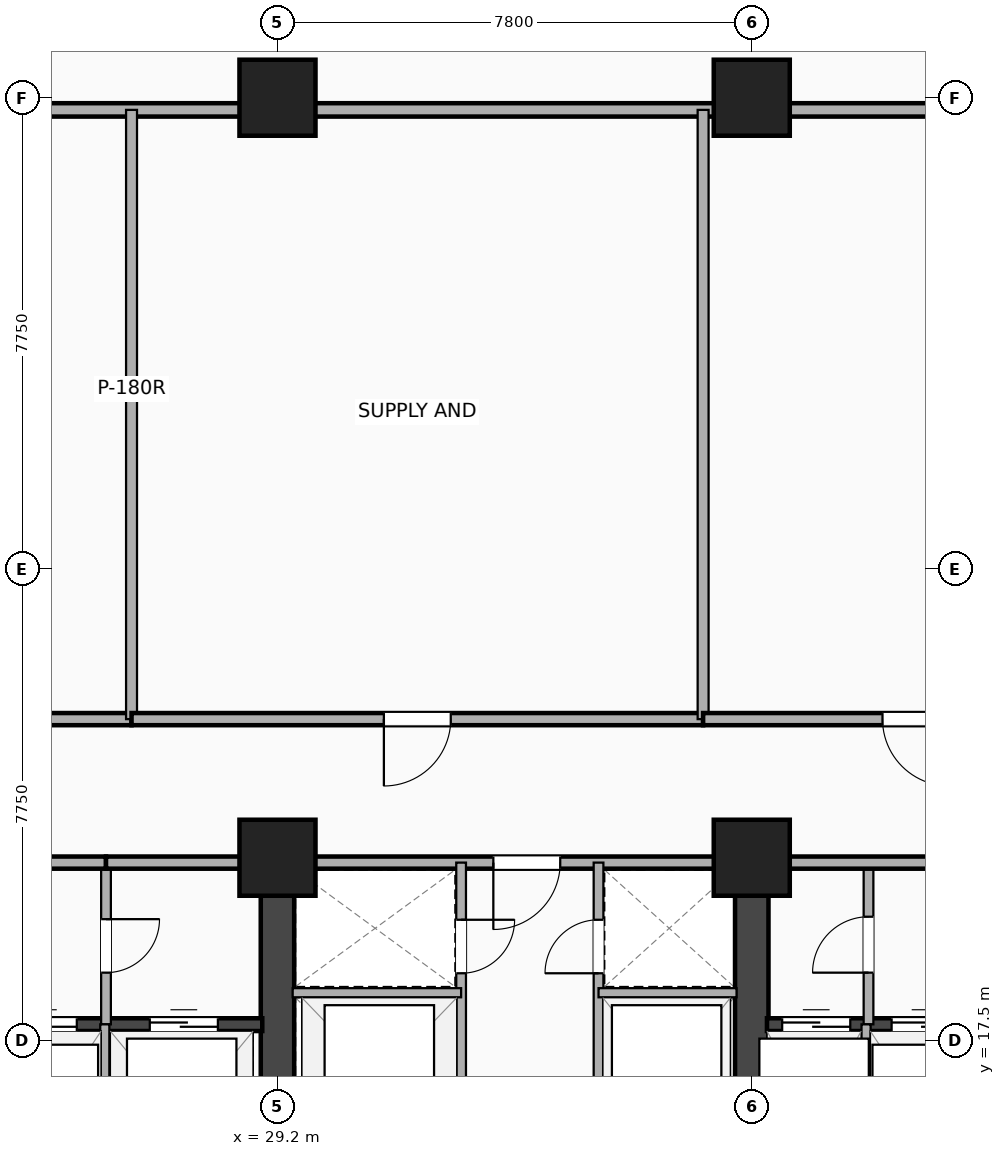
"""IFC4 building model, lengths in metres.
Left out: names, types, materials, properties, quantities, classifications, styles, units other than length and angle.
Written with IfcOpenShell. Run it as: python <this file> out.ifc"""

import sys

from ifc_helpers import new_model, si_unit, direction, frame, frame_2d, origin, origin_2d, place, context, subcontext, project, spatial, rectangle, extrude, element, fill, save


model = new_model("IFC4")
c1 = context("Model", 3, precision=1e-05, world=origin(), true_north=direction((0.0, 1.0)))
c2 = subcontext(c1, "Body", "Model", "MODEL_VIEW")
j1 = project(units=[si_unit("LENGTHUNIT", "METRE"), si_unit("PLANEANGLEUNIT", "RADIAN")], contexts=[c1])
p1 = place(None, origin())
s1 = spatial("IfcSite", under=j1, at=p1, CompositionType="ELEMENT")
p2 = place(p1, origin())
s2 = spatial("IfcBuilding", under=s1, at=p2, CompositionType="ELEMENT")
p3 = place(p2, frame((0.0, 0.0, 130.2)))
s3 = spatial("IfcBuildingStorey", under=s2, at=p3, CompositionType="ELEMENT", Elevation=130.2)
p4 = place(p3, frame((29.2, 3.5, 0.0), z_axis=(0.0, 0.0, 1.0), x_axis=(0.0, 1.0, 0.0)))
e1 = element("IfcWall", 1, at=p4, inside=s3, PredefinedType="SHEAR", context=c2, shape_type="SweptSolid", body=[
    extrude(rectangle(XDim=16.9, YDim=0.55, at=frame_2d((8.45, 0.0))), origin(), (0.0, 0.0, 1.0), 8.15),
])
p5 = place(p4, frame((7.75, 0.0, 0.0), z_axis=(0.0, 0.0, 1.0), x_axis=(-1.0, 0.0, 0.0)))
e2 = element("IfcOpeningElement", 2, at=p5, cuts=e1, PredefinedType="OPENING", context=c2, shape_type="SweptSolid", body=[
    extrude(rectangle(XDim=1.1, YDim=2.15, at=frame_2d((0.55, 1.075))), frame((0.0, 0.285, 0.0), z_axis=(0.0, -1.0, 0.0), x_axis=(1.0, 0.0, 0.0)), (0.0, 0.0, 1.0), 0.57),
])
p6 = place(p3, frame((37.0, 3.5, 0.0), z_axis=(0.0, 0.0, 1.0), x_axis=(0.0, 1.0, 0.0)))
e3 = element("IfcWall", 3, at=p6, inside=s3, PredefinedType="SHEAR", context=c2, shape_type="SweptSolid", body=[
    extrude(rectangle(XDim=16.9, YDim=0.55, at=frame_2d((8.45, 0.0))), origin(), (0.0, 0.0, 1.0), 8.15),
])
p7 = place(p6, frame((6.65, 0.0, 0.0)))
e4 = element("IfcOpeningElement", 4, at=p7, cuts=e3, PredefinedType="OPENING", context=c2, shape_type="SweptSolid", body=[
    extrude(rectangle(XDim=1.1, YDim=2.15, at=frame_2d((0.55, 1.075))), frame((0.0, 0.285, 0.0), z_axis=(0.0, -1.0, 0.0), x_axis=(1.0, 0.0, 0.0)), (0.0, 0.0, 1.0), 0.57),
])
p8 = place(p3, frame((20.65, 17.755, 0.0), z_axis=(0.0, 0.0, 1.0), x_axis=(1.0, 0.0, 0.0)))
e5 = element("IfcWall", 5, at=p8, inside=s3, PredefinedType="SHEAR", context=c2, shape_type="SweptSolid", body=[
    extrude(rectangle(XDim=8.3, YDim=0.21, at=frame_2d((4.15, 0.0))), origin(), (0.0, 0.0, 1.0), 8.15),
])
p9 = place(p8, frame((2.2, 0.0, 0.0), z_axis=(0.0, 0.0, 1.0), x_axis=(-1.0, 0.0, 0.0)))
e6 = element("IfcOpeningElement", 6, at=p9, cuts=e5, PredefinedType="OPENING", context=c2, shape_type="SweptSolid", body=[
    extrude(rectangle(XDim=1.05, YDim=2.15, at=frame_2d((0.525, 1.075))), frame((0.0, 0.115, 0.0), z_axis=(0.0, -1.0, 0.0), x_axis=(1.0, 0.0, 0.0)), (0.0, 0.0, 1.0), 0.23),
])
p10 = place(p8, frame((4.15, 0.0, 0.0)))
e7 = element("IfcOpeningElement", 7, at=p10, cuts=e5, PredefinedType="OPENING", context=c2, shape_type="SweptSolid", body=[
    extrude(rectangle(XDim=1.1, YDim=2.18, at=frame_2d((0.55, 1.09))), frame((0.0, 0.115, 0.0), z_axis=(0.0, -1.0, 0.0), x_axis=(1.0, 0.0, 0.0)), (0.0, 0.0, 1.0), 0.23),
])
p11 = place(p8, frame((6.45, 0.0, 0.0)))
e8 = element("IfcOpeningElement", 8, at=p11, cuts=e5, PredefinedType="OPENING", context=c2, shape_type="SweptSolid", body=[
    extrude(rectangle(XDim=1.12, YDim=2.2, at=frame_2d((0.56, 1.1))), frame((0.0, 0.115, 0.0), z_axis=(0.0, -1.0, 0.0), x_axis=(1.0, 0.0, 0.0)), (0.0, 0.0, 1.0), 0.23),
])
p12 = place(p3, frame((37.25, 17.755, 0.0), z_axis=(0.0, 0.0, 1.0), x_axis=(1.0, 0.0, 0.0)))
e9 = element("IfcWall", 9, at=p12, inside=s3, PredefinedType="SHEAR", context=c2, shape_type="SweptSolid", body=[
    extrude(rectangle(XDim=7.2, YDim=0.21, at=frame_2d((3.6, 0.0))), origin(), (0.0, 0.0, 1.0), 8.15),
])
p13 = place(p12, frame((0.25, 0.0, 0.0)))
e10 = element("IfcOpeningElement", 10, at=p13, cuts=e9, PredefinedType="OPENING", context=c2, shape_type="SweptSolid", body=[
    extrude(rectangle(XDim=1.12, YDim=2.2, at=frame_2d((0.56, 1.1))), frame((0.0, 0.115, 0.0), z_axis=(0.0, -1.0, 0.0), x_axis=(1.0, 0.0, 0.0)), (0.0, 0.0, 1.0), 0.23),
])
p14 = place(p12, frame((2.05, 0.0, 0.0)))
e11 = element("IfcOpeningElement", 11, at=p14, cuts=e9, PredefinedType="OPENING", context=c2, shape_type="SweptSolid", body=[
    extrude(rectangle(XDim=1.1, YDim=2.18, at=frame_2d((0.55, 1.09))), frame((0.0, 0.115, 0.0), z_axis=(0.0, -1.0, 0.0), x_axis=(1.0, 0.0, 0.0)), (0.0, 0.0, 1.0), 0.23),
])
p15 = place(p12, frame((5.78, 0.0, 0.0), z_axis=(0.0, 0.0, 1.0), x_axis=(-1.0, 0.0, 0.0)))
e12 = element("IfcOpeningElement", 12, at=p15, cuts=e9, PredefinedType="OPENING", context=c2, shape_type="SweptSolid", body=[
    extrude(rectangle(XDim=1.05, YDim=2.15, at=frame_2d((0.525, 1.075))), frame((0.0, 0.115, 0.0), z_axis=(0.0, -1.0, 0.0), x_axis=(1.0, 0.0, 0.0)), (0.0, 0.0, 1.0), 0.23),
])
for number, where, z_axis, x_axis in (
    (13, (29.2, 20.5, -0.32), (0.0, 0.0, 1.0), (1.0, 0.0, 0.0)),
    (14, (37.0, 20.5, -0.32), (0.0, 0.0, 1.0), (1.0, 0.0, 0.0)),
    (15, (29.2, 33.0, -0.32), (0.0, 0.0, 1.0), (1.0, 0.0, 0.0)),
    (16, (37.0, 33.0, -0.32), (0.0, 0.0, 1.0), (1.0, 0.0, 0.0)),
):
    element("IfcColumn", number, at=place(p3, frame(where, z_axis=z_axis, x_axis=x_axis)), inside=s3, PredefinedType="COLUMN", context=c2, shape_type="SweptSolid", body=[
        extrude(rectangle(XDim=1.25, YDim=1.25, at=origin_2d()), origin(), (0.0, 0.0, 1.0), 8.47),
    ])
p16 = place(p3, frame((26.38, 17.76, 0.0), z_axis=(0.0, 0.0, 1.0), x_axis=(0.0, 1.0, 0.0)))
e17 = element("IfcWall", 17, at=p16, inside=s3, PredefinedType="PARTITIONING", context=c2, shape_type="SweptSolid", body=[
    extrude(rectangle(XDim=2.66, YDim=0.16, at=frame_2d((1.33, 0.0))), origin(), (0.0, 0.0, 1.0), 7.524),
])
p17 = place(p16, frame((0.85, 0.0, 0.0)))
e18 = element("IfcOpeningElement", 18, at=p17, cuts=e17, PredefinedType="OPENING", context=c2, shape_type="SweptSolid", body=[
    extrude(rectangle(XDim=0.88, YDim=2.08, at=frame_2d((0.44, 1.04))), frame((0.0, 0.09, 0.0), z_axis=(0.0, -1.0, 0.0), x_axis=(1.0, 0.0, 0.0)), (0.0, 0.0, 1.0), 0.18),
])
p18 = place(p3, frame((38.92, 17.76, 0.0), z_axis=(0.0, 0.0, 1.0), x_axis=(0.0, 1.0, 0.0)))
e19 = element("IfcWall", 19, at=p18, inside=s3, PredefinedType="PARTITIONING", context=c2, shape_type="SweptSolid", body=[
    extrude(rectangle(XDim=2.66, YDim=0.16, at=frame_2d((1.33, 0.0))), origin(), (0.0, 0.0, 1.0), 7.524),
])
p19 = place(p18, frame((1.77, 0.0, 0.0), z_axis=(0.0, 0.0, 1.0), x_axis=(-1.0, 0.0, 0.0)))
e20 = element("IfcOpeningElement", 20, at=p19, cuts=e19, PredefinedType="OPENING", context=c2, shape_type="SweptSolid", body=[
    extrude(rectangle(XDim=0.92, YDim=2.08, at=frame_2d((0.46, 1.04))), frame((0.0, 0.09, 0.0), z_axis=(0.0, -1.0, 0.0), x_axis=(1.0, 0.0, 0.0)), (0.0, 0.0, 1.0), 0.18),
])
for number, where, z_axis, x_axis in (
    (21, (26.36, 14.72, 0.0), (0.0, 0.0, 1.0), (0.0, 1.0, 0.0)),
    (22, (38.88, 14.72, 0.0), (0.0, 0.0, 1.0), (0.0, 1.0, 0.0)),
):
    element("IfcWall", number, at=place(p3, frame(where, z_axis=z_axis, x_axis=x_axis)), inside=s3, PredefinedType="PARTITIONING", context=c2, shape_type="SweptSolid", body=[
        extrude(rectangle(XDim=3.04, YDim=0.15, at=frame_2d((1.52, 0.0))), origin(), (0.0, 0.0, 1.0), 8.15),
    ])
p20 = place(p3, frame((20.65, 20.42, 0.0), z_axis=(0.0, 0.0, 1.0), x_axis=(1.0, 0.0, 0.0)))
e23 = element("IfcWall", 23, at=p20, inside=s3, PredefinedType="PARTITIONING", context=c2, shape_type="SweptSolid", body=[
    extrude(rectangle(XDim=5.73, YDim=0.2, at=frame_2d((2.865, 0.0))), origin(), (0.0, 0.0, 1.0), 7.223),
])
p21 = place(p20, frame((2.3, 0.0, 0.0)))
e24 = element("IfcOpeningElement", 24, at=p21, cuts=e23, PredefinedType="OPENING", context=c2, shape_type="SweptSolid", body=[
    extrude(rectangle(XDim=1.1, YDim=2.15, at=frame_2d((0.55, 1.075))), frame((0.0, 0.11, 0.0), z_axis=(0.0, -1.0, 0.0), x_axis=(1.0, 0.0, 0.0)), (0.0, 0.0, 1.0), 0.22),
])
p22 = place(p3, frame((26.38, 20.42, 0.0), z_axis=(0.0, 0.0, 1.0), x_axis=(1.0, 0.0, 0.0)))
e25 = element("IfcWall", 25, at=p22, inside=s3, PredefinedType="PARTITIONING", context=c2, shape_type="SweptSolid", body=[
    extrude(rectangle(XDim=2.82, YDim=0.2, at=frame_2d((1.41, 0.0))), origin(), (0.0, 0.0, 1.0), 7.223),
])
p23 = place(p3, frame((29.2, 20.42, 0.0), z_axis=(0.0, 0.0, 1.0), x_axis=(1.0, 0.0, 0.0)))
e26 = element("IfcWall", 26, at=p23, inside=s3, PredefinedType="PARTITIONING", context=c2, shape_type="SweptSolid", body=[
    extrude(rectangle(XDim=7.8, YDim=0.2, at=frame_2d((3.9, 0.0))), origin(), (0.0, 0.0, 1.0), 7.223),
])
p24 = place(p23, frame((3.55, 0.0, 0.0)))
e27 = element("IfcOpeningElement", 27, at=p24, cuts=e26, PredefinedType="OPENING", context=c2, shape_type="SweptSolid", body=[
    extrude(rectangle(XDim=1.1, YDim=2.15, at=frame_2d((0.55, 1.075))), frame((0.0, 0.11, 0.0), z_axis=(0.0, -1.0, 0.0), x_axis=(1.0, 0.0, 0.0)), (0.0, 0.0, 1.0), 0.22),
])
p25 = place(p3, frame((37.0, 20.42, 0.0), z_axis=(0.0, 0.0, 1.0), x_axis=(1.0, 0.0, 0.0)))
e28 = element("IfcWall", 28, at=p25, inside=s3, PredefinedType="PARTITIONING", context=c2, shape_type="SweptSolid", body=[
    extrude(rectangle(XDim=7.45, YDim=0.2, at=frame_2d((3.725, 0.0))), origin(), (0.0, 0.0, 1.0), 6.455),
])
p26 = place(p25, frame((4.2, 0.0, 0.0)))
e29 = element("IfcOpeningElement", 29, at=p26, cuts=e28, PredefinedType="OPENING", context=c2, shape_type="SweptSolid", body=[
    extrude(rectangle(XDim=1.1, YDim=2.15, at=frame_2d((0.55, 1.075))), frame((0.0, 0.11, 0.0), z_axis=(0.0, -1.0, 0.0), x_axis=(1.0, 0.0, 0.0)), (0.0, 0.0, 1.0), 0.22),
])
p27 = place(p3, frame((32.22, 12.5, 0.0), z_axis=(0.0, 0.0, 1.0), x_axis=(0.0, 1.0, 0.0)))
e30 = element("IfcWall", 30, at=p27, inside=s3, PredefinedType="PARTITIONING", context=c2, shape_type="SweptSolid", body=[
    extrude(rectangle(XDim=7.92, YDim=0.16, at=frame_2d((3.96, 0.0))), origin(), (0.0, 0.0, 1.0), 7.524),
])
p28 = place(p27, frame((6.1, 0.0, 0.0)))
e31 = element("IfcOpeningElement", 31, at=p28, cuts=e30, PredefinedType="OPENING", context=c2, shape_type="SweptSolid", body=[
    extrude(rectangle(XDim=0.88, YDim=2.08, at=frame_2d((0.44, 1.04))), frame((0.0, 0.09, 0.0), z_axis=(0.0, -1.0, 0.0), x_axis=(1.0, 0.0, 0.0)), (0.0, 0.0, 1.0), 0.18),
])
p29 = place(p3, frame((34.48, 12.5, 0.0), z_axis=(0.0, 0.0, 1.0), x_axis=(0.0, 1.0, 0.0)))
e32 = element("IfcWall", 32, at=p29, inside=s3, PredefinedType="PARTITIONING", context=c2, shape_type="SweptSolid", body=[
    extrude(rectangle(XDim=7.92, YDim=0.16, at=frame_2d((3.96, 0.0))), origin(), (0.0, 0.0, 1.0), 7.524),
])
p30 = place(p29, frame((6.98, 0.0, 0.0), z_axis=(0.0, 0.0, 1.0), x_axis=(-1.0, 0.0, 0.0)))
e33 = element("IfcOpeningElement", 33, at=p30, cuts=e32, PredefinedType="OPENING", context=c2, shape_type="SweptSolid", body=[
    extrude(rectangle(XDim=0.88, YDim=2.08, at=frame_2d((0.44, 1.04))), frame((0.0, 0.09, 0.0), z_axis=(0.0, -1.0, 0.0), x_axis=(1.0, 0.0, 0.0)), (0.0, 0.0, 1.0), 0.18),
])
p31 = place(p3, frame((29.45, 18.28, 0.0), z_axis=(0.0, 0.0, 1.0), x_axis=(1.0, 0.0, 0.0)))
e34 = element("IfcWall", 34, at=p31, inside=s3, PredefinedType="PARTITIONING", context=c2, shape_type="SweptSolid", body=[
    extrude(rectangle(XDim=2.77, YDim=0.15, at=frame_2d((1.385, 0.0))), origin(), (0.0, 0.0, 1.0), 8.15),
])
p32 = place(p3, frame((34.48, 18.28, 0.0), z_axis=(0.0, 0.0, 1.0), x_axis=(1.0, 0.0, 0.0)))
e35 = element("IfcWall", 35, at=p32, inside=s3, PredefinedType="PARTITIONING", context=c2, shape_type="SweptSolid", body=[
    extrude(rectangle(XDim=2.27, YDim=0.15, at=frame_2d((1.135, 0.0))), origin(), (0.0, 0.0, 1.0), 8.15),
])
p33 = place(p3, frame((15.45, 32.8, 0.0), z_axis=(0.0, 0.0, 1.0), x_axis=(1.0, 0.0, 0.0)))
e36 = element("IfcWall", 36, at=p33, inside=s3, PredefinedType="PARTITIONING", context=c2, shape_type="SweptSolid", body=[
    extrude(rectangle(XDim=39.45, YDim=0.22, at=frame_2d((19.725, 0.0))), origin(), (0.0, 0.0, 1.0), 6.455),
])
p34 = place(p3, frame((15.45, 22.78, 0.0), z_axis=(0.0, 0.0, 1.0), x_axis=(1.0, 0.0, 0.0)))
e37 = element("IfcWall", 37, at=p34, inside=s3, PredefinedType="PARTITIONING", context=c2, shape_type="SweptSolid", body=[
    extrude(rectangle(XDim=11.35, YDim=0.2, at=frame_2d((5.675, 0.0))), origin(), (0.0, 0.0, 1.0), 7.223),
])
p35 = place(p34, frame((5.125, 0.0, 0.0)))
e38 = element("IfcOpeningElement", 38, at=p35, cuts=e37, PredefinedType="OPENING", context=c2, shape_type="SweptSolid", body=[
    extrude(rectangle(XDim=1.1, YDim=2.15, at=frame_2d((0.55, 1.075))), frame((0.0, 0.11, 0.0), z_axis=(0.0, -1.0, 0.0), x_axis=(1.0, 0.0, 0.0)), (0.0, 0.0, 1.0), 0.22),
])
p36 = place(p3, frame((26.8, 22.78, 0.0), z_axis=(0.0, 0.0, 1.0), x_axis=(0.0, 1.0, 0.0)))
e39 = element("IfcWall", 39, at=p36, inside=s3, PredefinedType="PARTITIONING", context=c2, shape_type="SweptSolid", body=[
    extrude(rectangle(XDim=10.02, YDim=0.18, at=frame_2d((5.01, 0.0))), origin(), (0.0, 0.0, 1.0), 7.524),
])
p37 = place(p3, frame((26.8, 22.78, 0.0), z_axis=(0.0, 0.0, 1.0), x_axis=(1.0, 0.0, 0.0)))
e40 = element("IfcWall", 40, at=p37, inside=s3, PredefinedType="PARTITIONING", context=c2, shape_type="SweptSolid", body=[
    extrude(rectangle(XDim=9.4, YDim=0.2, at=frame_2d((4.7, 0.0))), origin(), (0.0, 0.0, 1.0), 7.223),
])
p38 = place(p37, frame((4.15, 0.0, 0.0)))
e41 = element("IfcOpeningElement", 41, at=p38, cuts=e40, PredefinedType="OPENING", context=c2, shape_type="SweptSolid", body=[
    extrude(rectangle(XDim=1.1, YDim=2.15, at=frame_2d((0.55, 1.075))), frame((0.0, 0.11, 0.0), z_axis=(0.0, -1.0, 0.0), x_axis=(1.0, 0.0, 0.0)), (0.0, 0.0, 1.0), 0.22),
])
p39 = place(p3, frame((36.2, 22.78, 0.0), z_axis=(0.0, 0.0, 1.0), x_axis=(0.0, 1.0, 0.0)))
e42 = element("IfcWall", 42, at=p39, inside=s3, PredefinedType="PARTITIONING", context=c2, shape_type="SweptSolid", body=[
    extrude(rectangle(XDim=10.02, YDim=0.18, at=frame_2d((5.01, 0.0))), origin(), (0.0, 0.0, 1.0), 6.455),
])
p40 = place(p3, frame((36.2, 22.78, 0.0), z_axis=(0.0, 0.0, 1.0), x_axis=(1.0, 0.0, 0.0)))
e43 = element("IfcWall", 43, at=p40, inside=s3, PredefinedType="PARTITIONING", context=c2, shape_type="SweptSolid", body=[
    extrude(rectangle(XDim=7.0, YDim=0.2, at=frame_2d((3.5, 0.0))), origin(), (0.0, 0.0, 1.0), 7.223),
])
p41 = place(p40, frame((2.95, 0.0, 0.0)))
e44 = element("IfcOpeningElement", 44, at=p41, cuts=e43, PredefinedType="OPENING", context=c2, shape_type="SweptSolid", body=[
    extrude(rectangle(XDim=1.1, YDim=2.15, at=frame_2d((0.55, 1.075))), frame((0.0, 0.11, 0.0), z_axis=(0.0, -1.0, 0.0), x_axis=(1.0, 0.0, 0.0)), (0.0, 0.0, 1.0), 0.22),
])
p42 = place(p10, origin())
e45 = element("IfcDoor", 45, at=p42, inside=s3, OperationType="DOUBLE_DOOR_SLIDING", PredefinedType="DOOR", context=c2, shape_type="SweptSolid", body=[
    extrude(rectangle(XDim=1.1, YDim=2.18, at=frame_2d((0.55, 1.09))), frame((0.0, 0.025, 0.0), z_axis=(0.0, -1.0, 0.0), x_axis=(1.0, 0.0, 0.0)), (0.0, 0.0, 1.0), 0.05),
])
fill(e7, e45)
p43 = place(p11, origin())
e46 = element("IfcDoor", 46, at=p43, inside=s3, OperationType="DOUBLE_DOOR_SLIDING", PredefinedType="DOOR", context=c2, shape_type="SweptSolid", body=[
    extrude(rectangle(XDim=1.12, YDim=2.2, at=frame_2d((0.56, 1.1))), frame((0.0, 0.025, 0.0), z_axis=(0.0, -1.0, 0.0), x_axis=(1.0, 0.0, 0.0)), (0.0, 0.0, 1.0), 0.05),
])
fill(e8, e46)
p44 = place(p13, origin())
e47 = element("IfcDoor", 47, at=p44, inside=s3, OperationType="DOUBLE_DOOR_SLIDING", PredefinedType="DOOR", context=c2, shape_type="SweptSolid", body=[
    extrude(rectangle(XDim=1.12, YDim=2.2, at=frame_2d((0.56, 1.1))), frame((0.0, 0.025, 0.0), z_axis=(0.0, -1.0, 0.0), x_axis=(1.0, 0.0, 0.0)), (0.0, 0.0, 1.0), 0.05),
])
fill(e10, e47)
p45 = place(p14, origin())
e48 = element("IfcDoor", 48, at=p45, inside=s3, OperationType="DOUBLE_DOOR_SLIDING", PredefinedType="DOOR", context=c2, shape_type="SweptSolid", body=[
    extrude(rectangle(XDim=1.1, YDim=2.18, at=frame_2d((0.55, 1.09))), frame((0.0, 0.025, 0.0), z_axis=(0.0, -1.0, 0.0), x_axis=(1.0, 0.0, 0.0)), (0.0, 0.0, 1.0), 0.05),
])
fill(e11, e48)
p46 = place(p17, origin())
e49 = element("IfcDoor", 49, at=p46, inside=s3, OperationType="SINGLE_SWING_RIGHT", PredefinedType="DOOR", context=c2, shape_type="SweptSolid", body=[
    extrude(rectangle(XDim=0.88, YDim=2.08, at=frame_2d((0.44, 1.04))), frame((0.0, 0.025, 0.0), z_axis=(0.0, -1.0, 0.0), x_axis=(1.0, 0.0, 0.0)), (0.0, 0.0, 1.0), 0.05),
])
fill(e18, e49)
p47 = place(p19, origin())
e50 = element("IfcDoor", 50, at=p47, inside=s3, OperationType="SINGLE_SWING_LEFT", PredefinedType="DOOR", context=c2, shape_type="SweptSolid", body=[
    extrude(rectangle(XDim=0.92, YDim=2.08, at=frame_2d((0.46, 1.04))), frame((0.0, 0.025, 0.0), z_axis=(0.0, -1.0, 0.0), x_axis=(1.0, 0.0, 0.0)), (0.0, 0.0, 1.0), 0.05),
])
fill(e20, e50)
p48 = place(p24, origin())
e51 = element("IfcDoor", 51, at=p48, inside=s3, OperationType="SINGLE_SWING_LEFT", PredefinedType="DOOR", context=c2, shape_type="SweptSolid", body=[
    extrude(rectangle(XDim=1.1, YDim=2.15, at=frame_2d((0.55, 1.075))), frame((0.0, 0.025, 0.0), z_axis=(0.0, -1.0, 0.0), x_axis=(1.0, 0.0, 0.0)), (0.0, 0.0, 1.0), 0.05),
])
fill(e27, e51)
p49 = place(p28, origin())
e52 = element("IfcDoor", 52, at=p49, inside=s3, OperationType="SINGLE_SWING_RIGHT", PredefinedType="DOOR", context=c2, shape_type="SweptSolid", body=[
    extrude(rectangle(XDim=0.88, YDim=2.08, at=frame_2d((0.44, 1.04))), frame((0.0, 0.025, 0.0), z_axis=(0.0, -1.0, 0.0), x_axis=(1.0, 0.0, 0.0)), (0.0, 0.0, 1.0), 0.05),
])
fill(e31, e52)
p50 = place(p30, origin())
e53 = element("IfcDoor", 53, at=p50, inside=s3, OperationType="SINGLE_SWING_LEFT", PredefinedType="DOOR", context=c2, shape_type="SweptSolid", body=[
    extrude(rectangle(XDim=0.88, YDim=2.08, at=frame_2d((0.44, 1.04))), frame((0.0, 0.025, 0.0), z_axis=(0.0, -1.0, 0.0), x_axis=(1.0, 0.0, 0.0)), (0.0, 0.0, 1.0), 0.05),
])
fill(e33, e53)
p51 = place(p38, origin())
e54 = element("IfcDoor", 54, at=p51, inside=s3, OperationType="SINGLE_SWING_LEFT", PredefinedType="DOOR", context=c2, shape_type="SweptSolid", body=[
    extrude(rectangle(XDim=1.1, YDim=2.15, at=frame_2d((0.55, 1.075))), frame((0.0, 0.025, 0.0), z_axis=(0.0, -1.0, 0.0), x_axis=(1.0, 0.0, 0.0)), (0.0, 0.0, 1.0), 0.05),
])
fill(e41, e54)
p52 = place(p41, origin())
e55 = element("IfcDoor", 55, at=p52, inside=s3, OperationType="SINGLE_SWING_RIGHT", PredefinedType="DOOR", context=c2, shape_type="SweptSolid", body=[
    extrude(rectangle(XDim=1.1, YDim=2.15, at=frame_2d((0.55, 1.075))), frame((0.0, 0.025, 0.0), z_axis=(0.0, -1.0, 0.0), x_axis=(1.0, 0.0, 0.0)), (0.0, 0.0, 1.0), 0.05),
])
fill(e44, e55)
save(model, sys.argv[1])
